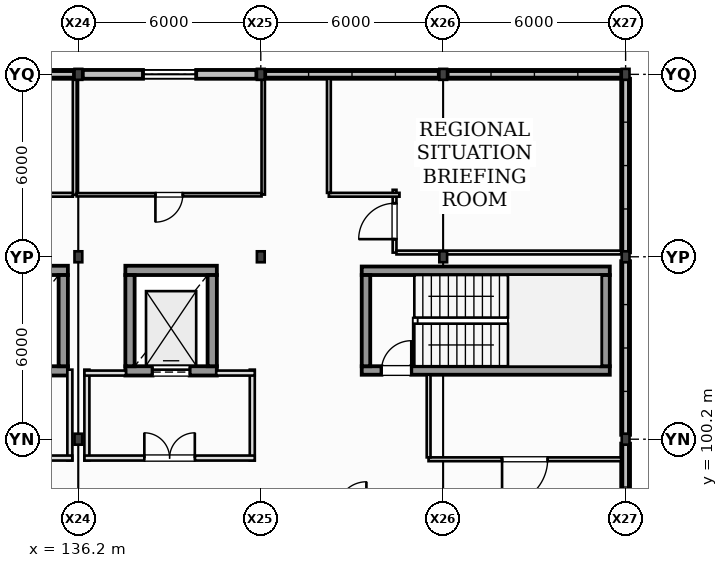
"""IFC4 building model, lengths in metres.
Left out: names, types, materials, properties, quantities, classifications, styles, units other than length and angle.
Written with IfcOpenShell. Run it as: python <this file> out.ifc"""

import sys

from ifc_helpers import new_model, si_unit, direction, frame, frame_2d, origin, origin_2d, place, context, subcontext, project, spatial, rectangle, i_section, extrude, element, fill, save


model = new_model("IFC4")
c1 = context("Model", 3, precision=1e-05, world=origin(), true_north=direction((0.0, 1.0)))
c2 = subcontext(c1, "Body", "Model", "MODEL_VIEW")
j1 = project(units=[si_unit("LENGTHUNIT", "METRE"), si_unit("PLANEANGLEUNIT", "RADIAN")], contexts=[c1])
p1 = place(None, origin())
s1 = spatial("IfcSite", under=j1, at=p1, CompositionType="ELEMENT")
p2 = place(p1, origin())
s2 = spatial("IfcBuilding", under=s1, at=p2, CompositionType="ELEMENT")
p3 = place(p2, frame((0.0, 0.0, 18.0)))
s3 = spatial("IfcBuildingStorey", under=s2, at=p3, CompositionType="ELEMENT", Elevation=18.0)
for number, where, z_axis, x_axis in (
    (1, (136.2, 100.2, 0.0), (0.0, 0.0, 1.0), (1.0, 0.0, 0.0)),
    (2, (136.2, 106.2, 0.0), (0.0, 0.0, 1.0), (1.0, 0.0, 0.0)),
    (3, (136.2, 112.2, 0.0), (0.0, 0.0, 1.0), (1.0, 0.0, 0.0)),
    (4, (142.2, 106.2, 0.0), (0.0, 0.0, 1.0), (1.0, 0.0, 0.0)),
    (5, (142.2, 112.2, 0.0), (0.0, 0.0, 1.0), (1.0, 0.0, 0.0)),
    (6, (148.2, 106.2, 0.0), (0.0, 0.0, 1.0), (1.0, 0.0, 0.0)),
    (7, (148.2, 112.2, 0.0), (0.0, 0.0, 1.0), (1.0, 0.0, 0.0)),
    (8, (154.2, 100.2, 0.0), (0.0, 0.0, 1.0), (1.0, 0.0, 0.0)),
    (9, (154.2, 106.2, 0.0), (0.0, 0.0, 1.0), (1.0, 0.0, 0.0)),
    (10, (154.2, 112.2, 0.0), (0.0, 0.0, 1.0), (1.0, 0.0, 0.0)),
):
    element("IfcColumn", number, at=place(p3, frame(where, z_axis=z_axis, x_axis=x_axis)), inside=s3, PredefinedType="COLUMN", context=c2, shape_type="SweptSolid", body=[
        extrude(i_section(OverallWidth=0.256, OverallDepth=0.36, WebThickness=0.011, FlangeThickness=0.02, at=origin_2d()), origin(), (0.0, 0.0, 1.0), 3.6),
    ])
p4 = place(p3, frame((136.055, 112.2, 0.0), z_axis=(0.0, 0.0, 1.0), x_axis=(-1.0, 0.0, 0.0)))
e11 = element("IfcWall", 11, at=p4, inside=s3, PredefinedType="STANDARD", context=c2, shape_type="SweptSolid", body=[
    extrude(rectangle(XDim=5.71, YDim=0.29, at=frame_2d((2.855, 0.0))), origin(), (0.0, 0.0, 1.0), 0.56),
])
p5 = place(p3, frame((142.055, 112.2, 0.0), z_axis=(0.0, 0.0, 1.0), x_axis=(-1.0, 0.0, 0.0)))
e12 = element("IfcWall", 12, at=p5, inside=s3, PredefinedType="STANDARD", context=c2, shape_type="SweptSolid", body=[
    extrude(rectangle(XDim=5.71, YDim=0.29, at=frame_2d((2.855, 0.0))), origin(), (0.0, 0.0, 1.0), 3.6),
])
p6 = place(p5, frame((1.98, 0.0, 0.85)))
e13 = element("IfcOpeningElement", 13, at=p6, cuts=e12, PredefinedType="OPENING", context=c2, shape_type="SweptSolid", body=[
    extrude(rectangle(XDim=1.75, YDim=1.75, at=frame_2d((0.875, 0.875))), frame((0.0, 0.155, 0.0), z_axis=(0.0, -1.0, 0.0), x_axis=(1.0, 0.0, 0.0)), (0.0, 0.0, 1.0), 0.31),
])
p7 = place(p3, frame((148.055, 112.2, 0.0), z_axis=(0.0, 0.0, 1.0), x_axis=(-1.0, 0.0, 0.0)))
e14 = element("IfcWall", 14, at=p7, inside=s3, PredefinedType="STANDARD", context=c2, shape_type="SweptSolid", body=[
    extrude(rectangle(XDim=5.71, YDim=0.29, at=frame_2d((2.855, 0.0))), origin(), (0.0, 0.0, 1.0), 0.68),
])
p8 = place(p3, frame((154.055, 112.2, 0.0), z_axis=(0.0, 0.0, 1.0), x_axis=(-1.0, 0.0, 0.0)))
e15 = element("IfcWall", 15, at=p8, inside=s3, PredefinedType="STANDARD", context=c2, shape_type="SweptSolid", body=[
    extrude(rectangle(XDim=5.71, YDim=0.29, at=frame_2d((2.855, 0.0))), origin(), (0.0, 0.0, 1.0), 0.8),
])
p9 = place(p3, frame((154.2, 94.345, 0.0), z_axis=(0.0, 0.0, 1.0), x_axis=(0.0, 1.0, 0.0)))
e16 = element("IfcWall", 16, at=p9, inside=s3, PredefinedType="STANDARD", context=c2, shape_type="SweptSolid", body=[
    extrude(rectangle(XDim=5.71, YDim=0.29, at=frame_2d((2.855, 0.0))), origin(), (0.0, 0.0, 1.0), 0.44),
])
p10 = place(p3, frame((154.2, 100.345, 0.0), z_axis=(0.0, 0.0, 1.0), x_axis=(0.0, 1.0, 0.0)))
e17 = element("IfcWall", 17, at=p10, inside=s3, PredefinedType="STANDARD", context=c2, shape_type="SweptSolid", body=[
    extrude(rectangle(XDim=5.71, YDim=0.29, at=frame_2d((2.855, 0.0))), origin(), (0.0, 0.0, 1.0), 0.56),
])
p11 = place(p3, frame((154.2, 106.345, 0.0), z_axis=(0.0, 0.0, 1.0), x_axis=(0.0, 1.0, 0.0)))
e18 = element("IfcWall", 18, at=p11, inside=s3, PredefinedType="STANDARD", context=c2, shape_type="SweptSolid", body=[
    extrude(rectangle(XDim=5.71, YDim=0.29, at=frame_2d((2.855, 0.0))), origin(), (0.0, 0.0, 1.0), 0.68),
])
p12 = place(p3, frame((145.52, 102.46, 0.0), z_axis=(0.0, 0.0, 1.0), x_axis=(1.0, 0.0, 0.0)))
e19 = element("IfcWall", 19, at=p12, inside=s3, PredefinedType="SHEAR", context=c2, shape_type="SweptSolid", body=[
    extrude(rectangle(XDim=8.16, YDim=0.28, at=frame_2d((4.08, 0.0))), origin(), (0.0, 0.0, 1.0), 3.45),
])
p13 = place(p12, frame((0.65, 0.0, 0.0)))
e20 = element("IfcOpeningElement", 20, at=p13, cuts=e19, PredefinedType="OPENING", context=c2, shape_type="SweptSolid", body=[
    extrude(rectangle(XDim=0.98, YDim=2.15, at=frame_2d((0.49, 1.075))), frame((0.0, 0.15, 0.0), z_axis=(0.0, -1.0, 0.0), x_axis=(1.0, 0.0, 0.0)), (0.0, 0.0, 1.0), 0.3),
])
p14 = place(p3, frame((153.68, 105.74, 0.0), z_axis=(0.0, 0.0, 1.0), x_axis=(-1.0, 0.0, 0.0)))
e21 = element("IfcWall", 21, at=p14, inside=s3, PredefinedType="SHEAR", context=c2, shape_type="SweptSolid", body=[
    extrude(rectangle(XDim=8.16, YDim=0.28, at=frame_2d((4.08, 0.0))), origin(), (0.0, 0.0, 1.0), 3.45),
])
for number, where, z_axis, x_axis in (
    (22, (145.66, 105.6, 0.0), (0.0, 0.0, 1.0), (0.0, -1.0, 0.0)),
    (23, (153.54, 102.6, 0.0), (0.0, 0.0, 1.0), (0.0, 1.0, 0.0)),
):
    element("IfcWall", number, at=place(p3, frame(where, z_axis=z_axis, x_axis=x_axis)), inside=s3, PredefinedType="SHEAR", context=c2, shape_type="SweptSolid", body=[
        extrude(rectangle(XDim=3.0, YDim=0.28, at=frame_2d((1.5, 0.0))), origin(), (0.0, 0.0, 1.0), 3.45),
    ])
p15 = place(p3, frame((132.845, 102.448, 0.0), z_axis=(0.0, 0.0, 1.0), x_axis=(1.0, 0.0, 0.0)))
e24 = element("IfcWall", 24, at=p15, inside=s3, PredefinedType="SHEAR", context=c2, shape_type="SweptSolid", body=[
    extrude(rectangle(XDim=3.01, YDim=0.305, at=frame_2d((1.505, 0.0))), origin(), (0.0, 0.0, 1.0), 3.45),
])
p16 = place(p15, frame((0.895, 0.0, 0.0)))
e25 = element("IfcOpeningElement", 25, at=p16, cuts=e24, PredefinedType="OPENING", context=c2, shape_type="SweptSolid", body=[
    extrude(rectangle(XDim=1.22, YDim=2.22, at=frame_2d((0.61, 1.11))), frame((0.0, 0.162, 0.0), z_axis=(0.0, -1.0, 0.0), x_axis=(1.0, 0.0, 0.0)), (0.0, 0.0, 1.0), 0.325),
])
p17 = place(p3, frame((135.855, 105.752, 0.0), z_axis=(0.0, 0.0, 1.0), x_axis=(-1.0, 0.0, 0.0)))
e26 = element("IfcWall", 26, at=p17, inside=s3, PredefinedType="SHEAR", context=c2, shape_type="SweptSolid", body=[
    extrude(rectangle(XDim=3.01, YDim=0.305, at=frame_2d((1.505, 0.0))), origin(), (0.0, 0.0, 1.0), 3.45),
])
p18 = place(p3, frame((135.702, 102.6, 0.0), z_axis=(0.0, 0.0, 1.0), x_axis=(0.0, 1.0, 0.0)))
e27 = element("IfcWall", 27, at=p18, inside=s3, PredefinedType="SHEAR", context=c2, shape_type="SweptSolid", body=[
    extrude(rectangle(XDim=3.0, YDim=0.305, at=frame_2d((1.5, 0.0))), origin(), (0.0, 0.0, 1.0), 3.45),
])
p19 = place(p3, frame((135.92, 102.488, 0.0), z_axis=(0.0, 0.0, 1.0), x_axis=(0.0, -1.0, 0.0)))
e28 = element("IfcWall", 28, at=p19, inside=s3, PredefinedType="PARTITIONING", context=c2, shape_type="SweptSolid", body=[
    extrude(rectangle(XDim=2.988, YDim=0.165, at=frame_2d((1.494, 0.0))), origin(), (0.0, 0.0, 1.0), 3.36),
])
p20 = place(p3, frame((130.4, 99.58, 0.0), z_axis=(0.0, 0.0, 1.0), x_axis=(1.0, 0.0, 0.0)))
e29 = element("IfcWall", 29, at=p20, inside=s3, PredefinedType="PARTITIONING", context=c2, shape_type="SweptSolid", body=[
    extrude(rectangle(XDim=5.6, YDim=0.165, at=frame_2d((2.8, 0.0))), origin(), (0.0, 0.0, 1.0), 3.36),
])
p21 = place(p20, frame((1.97, 0.0, 0.0)))
e30 = element("IfcOpeningElement", 30, at=p21, cuts=e29, PredefinedType="OPENING", context=c2, shape_type="SweptSolid", body=[
    extrude(rectangle(XDim=1.66, YDim=2.2, at=frame_2d((0.83, 1.1))), frame((0.0, 0.093, 0.0), z_axis=(0.0, -1.0, 0.0), x_axis=(1.0, 0.0, 0.0)), (0.0, 0.0, 1.0), 0.185),
])
p22 = place(p3, frame((137.745, 102.448, 0.0), z_axis=(0.0, 0.0, 1.0), x_axis=(1.0, 0.0, 0.0)))
e31 = element("IfcWall", 31, at=p22, inside=s3, PredefinedType="SHEAR", context=c2, shape_type="SweptSolid", body=[
    extrude(rectangle(XDim=3.01, YDim=0.305, at=frame_2d((1.505, 0.0))), origin(), (0.0, 0.0, 1.0), 3.45),
])
p23 = place(p22, frame((0.895, 0.0, 0.0)))
e32 = element("IfcOpeningElement", 32, at=p23, cuts=e31, PredefinedType="OPENING", context=c2, shape_type="SweptSolid", body=[
    extrude(rectangle(XDim=1.22, YDim=2.22, at=frame_2d((0.61, 1.11))), frame((0.0, 0.162, 0.0), z_axis=(0.0, -1.0, 0.0), x_axis=(1.0, 0.0, 0.0)), (0.0, 0.0, 1.0), 0.325),
])
p24 = place(p3, frame((140.755, 105.752, 0.0), z_axis=(0.0, 0.0, 1.0), x_axis=(-1.0, 0.0, 0.0)))
e33 = element("IfcWall", 33, at=p24, inside=s3, PredefinedType="SHEAR", context=c2, shape_type="SweptSolid", body=[
    extrude(rectangle(XDim=3.01, YDim=0.305, at=frame_2d((1.505, 0.0))), origin(), (0.0, 0.0, 1.0), 3.45),
])
for number, where, z_axis, x_axis in (
    (34, (137.897, 105.6, 0.0), (0.0, 0.0, 1.0), (0.0, -1.0, 0.0)),
    (35, (140.603, 102.6, 0.0), (0.0, 0.0, 1.0), (0.0, 1.0, 0.0)),
):
    element("IfcWall", number, at=place(p3, frame(where, z_axis=z_axis, x_axis=x_axis)), inside=s3, PredefinedType="SHEAR", context=c2, shape_type="SweptSolid", body=[
        extrude(rectangle(XDim=3.0, YDim=0.305, at=frame_2d((1.5, 0.0))), origin(), (0.0, 0.0, 1.0), 3.45),
    ])
p25 = place(p3, frame((136.48, 99.5, 0.0), z_axis=(0.0, 0.0, 1.0), x_axis=(0.0, 1.0, 0.0)))
e36 = element("IfcWall", 36, at=p25, inside=s3, PredefinedType="PARTITIONING", context=c2, shape_type="SweptSolid", body=[
    extrude(rectangle(XDim=2.988, YDim=0.165, at=frame_2d((1.494, 0.0))), origin(), (0.0, 0.0, 1.0), 3.36),
])
p26 = place(p3, frame((141.92, 102.488, 0.0), z_axis=(0.0, 0.0, 1.0), x_axis=(0.0, -1.0, 0.0)))
e37 = element("IfcWall", 37, at=p26, inside=s3, PredefinedType="PARTITIONING", context=c2, shape_type="SweptSolid", body=[
    extrude(rectangle(XDim=2.988, YDim=0.165, at=frame_2d((1.494, 0.0))), origin(), (0.0, 0.0, 1.0), 3.246),
])
p27 = place(p3, frame((136.4, 102.375, 0.0), z_axis=(0.0, 0.0, 1.0), x_axis=(1.0, 0.0, 0.0)))
e38 = element("IfcWall", 38, at=p27, inside=s3, PredefinedType="PARTITIONING", context=c2, shape_type="SweptSolid", body=[
    extrude(rectangle(XDim=1.365, YDim=0.165, at=frame_2d((0.683, 0.0))), origin(), (0.0, 0.0, 1.0), 3.36),
])
p28 = place(p3, frame((140.735, 102.375, 0.0), z_axis=(0.0, 0.0, 1.0), x_axis=(1.0, 0.0, 0.0)))
e39 = element("IfcWall", 39, at=p28, inside=s3, PredefinedType="PARTITIONING", context=c2, shape_type="SweptSolid", body=[
    extrude(rectangle(XDim=1.265, YDim=0.165, at=frame_2d((0.632, 0.0))), origin(), (0.0, 0.0, 1.0), 3.36),
])
p29 = place(p3, frame((136.4, 99.58, 0.0), z_axis=(0.0, 0.0, 1.0), x_axis=(1.0, 0.0, 0.0)))
e40 = element("IfcWall", 40, at=p29, inside=s3, PredefinedType="PARTITIONING", context=c2, shape_type="SweptSolid", body=[
    extrude(rectangle(XDim=5.6, YDim=0.165, at=frame_2d((2.8, 0.0))), origin(), (0.0, 0.0, 1.0), 3.36),
])
p30 = place(p29, frame((1.97, 0.0, 0.0)))
e41 = element("IfcOpeningElement", 41, at=p30, cuts=e40, PredefinedType="OPENING", context=c2, shape_type="SweptSolid", body=[
    extrude(rectangle(XDim=1.66, YDim=2.2, at=frame_2d((0.83, 1.1))), frame((0.0, 0.093, 0.0), z_axis=(0.0, -1.0, 0.0), x_axis=(1.0, 0.0, 0.0)), (0.0, 0.0, 1.0), 0.185),
])
p31 = place(p3, frame((136.08, 112.055, 0.0), z_axis=(0.0, 0.0, 1.0), x_axis=(0.0, -1.0, 0.0)))
e42 = element("IfcWall", 42, at=p31, inside=s3, PredefinedType="PARTITIONING", context=c2, shape_type="SweptSolid", body=[
    extrude(rectangle(XDim=3.817, YDim=0.125, at=frame_2d((1.909, 0.0))), origin(), (0.0, 0.0, 1.0), 3.36),
])
p32 = place(p3, frame((136.018, 108.24, 0.0), z_axis=(0.0, 0.0, 1.0), x_axis=(-1.0, 0.0, 0.0)))
e43 = element("IfcWall", 43, at=p32, inside=s3, PredefinedType="PARTITIONING", context=c2, shape_type="SweptSolid", body=[
    extrude(rectangle(XDim=2.38, YDim=0.125, at=frame_2d((1.19, 0.0))), origin(), (0.0, 0.0, 1.0), 3.36),
])
p33 = place(p32, frame((0.74, 0.0, 0.0)))
e44 = element("IfcOpeningElement", 44, at=p33, cuts=e43, PredefinedType="OPENING", context=c2, shape_type="SweptSolid", body=[
    extrude(rectangle(XDim=0.9, YDim=2.1, at=frame_2d((0.45, 1.05))), frame((0.0, 0.073, 0.0), z_axis=(0.0, -1.0, 0.0), x_axis=(1.0, 0.0, 0.0)), (0.0, 0.0, 1.0), 0.145),
])
p34 = place(p3, frame((142.28, 112.055, 0.0), z_axis=(0.0, 0.0, 1.0), x_axis=(0.0, -1.0, 0.0)))
e45 = element("IfcWall", 45, at=p34, inside=s3, PredefinedType="PARTITIONING", context=c2, shape_type="SweptSolid", body=[
    extrude(rectangle(XDim=3.81, YDim=0.11, at=frame_2d((1.905, 0.0))), origin(), (0.0, 0.0, 1.0), 3.36),
])
p35 = place(p3, frame((142.225, 108.24, 0.0), z_axis=(0.0, 0.0, 1.0), x_axis=(-1.0, 0.0, 0.0)))
e46 = element("IfcWall", 46, at=p35, inside=s3, PredefinedType="PARTITIONING", context=c2, shape_type="SweptSolid", body=[
    extrude(rectangle(XDim=6.083, YDim=0.11, at=frame_2d((3.041, 0.0))), origin(), (0.0, 0.0, 1.0), 3.36),
])
p36 = place(p35, frame((2.591, 0.0, 0.0)))
e47 = element("IfcOpeningElement", 47, at=p36, cuts=e46, PredefinedType="OPENING", context=c2, shape_type="SweptSolid", body=[
    extrude(rectangle(XDim=0.9, YDim=2.1, at=frame_2d((0.45, 1.05))), frame((0.0, 0.065, 0.0), z_axis=(0.0, -1.0, 0.0), x_axis=(1.0, 0.0, 0.0)), (0.0, 0.0, 1.0), 0.13),
])
p37 = place(p3, frame((146.6, 106.337, 0.0), z_axis=(0.0, 0.0, 1.0), x_axis=(0.0, 1.0, 0.0)))
e48 = element("IfcWall", 48, at=p37, inside=s3, PredefinedType="PARTITIONING", context=c2, shape_type="SweptSolid", body=[
    extrude(rectangle(XDim=2.065, YDim=0.125, at=frame_2d((1.033, 0.0))), origin(), (0.0, 0.0, 1.0), 3.36),
])
p38 = place(p37, frame((0.442, 0.0, 0.0)))
e49 = element("IfcOpeningElement", 49, at=p38, cuts=e48, PredefinedType="OPENING", context=c2, shape_type="SweptSolid", body=[
    extrude(rectangle(XDim=1.18, YDim=2.16, at=frame_2d((0.59, 1.08))), frame((0.0, 0.073, 0.0), z_axis=(0.0, -1.0, 0.0), x_axis=(1.0, 0.0, 0.0)), (0.0, 0.0, 1.0), 0.145),
])
p39 = place(p3, frame((146.762, 108.24, 0.0), z_axis=(0.0, 0.0, 1.0), x_axis=(-1.0, 0.0, 0.0)))
e50 = element("IfcWall", 50, at=p39, inside=s3, PredefinedType="PARTITIONING", context=c2, shape_type="SweptSolid", body=[
    extrude(rectangle(XDim=2.325, YDim=0.125, at=frame_2d((1.163, 0.0))), origin(), (0.0, 0.0, 1.0), 3.36),
])
p40 = place(p3, frame((144.44, 108.302, 0.0), z_axis=(0.0, 0.0, 1.0), x_axis=(0.0, 1.0, 0.0)))
e51 = element("IfcWall", 51, at=p40, inside=s3, PredefinedType="PARTITIONING", context=c2, shape_type="SweptSolid", body=[
    extrude(rectangle(XDim=3.752, YDim=0.125, at=frame_2d((1.876, 0.0))), origin(), (0.0, 0.0, 1.0), 3.36),
])
p41 = place(p3, frame((154.055, 106.34, 0.0), z_axis=(0.0, 0.0, 1.0), x_axis=(-1.0, 0.0, 0.0)))
e52 = element("IfcWall", 52, at=p41, inside=s3, PredefinedType="PARTITIONING", context=c2, shape_type="SweptSolid", body=[
    extrude(rectangle(XDim=7.392, YDim=0.125, at=frame_2d((3.696, 0.0))), origin(), (0.0, 0.0, 1.0), 3.36),
])
p42 = place(p3, frame((154.055, 99.54, 0.0), z_axis=(0.0, 0.0, 1.0), x_axis=(-1.0, 0.0, 0.0)))
e53 = element("IfcWall", 53, at=p42, inside=s3, PredefinedType="PARTITIONING", context=c2, shape_type="SweptSolid", body=[
    extrude(rectangle(XDim=6.337, YDim=0.125, at=frame_2d((3.169, 0.0))), origin(), (0.0, 0.0, 1.0), 3.36),
])
p43 = place(p42, frame((2.419, 0.0, 0.0)))
e54 = element("IfcOpeningElement", 54, at=p43, cuts=e53, PredefinedType="OPENING", context=c2, shape_type="SweptSolid", body=[
    extrude(rectangle(XDim=1.5, YDim=2.22, at=frame_2d((0.75, 1.11))), frame((0.0, 0.073, 0.0), z_axis=(0.0, -1.0, 0.0), x_axis=(1.0, 0.0, 0.0)), (0.0, 0.0, 1.0), 0.145),
])
p44 = place(p3, frame((147.72, 99.603, 0.0), z_axis=(0.0, 0.0, 1.0), x_axis=(0.0, 1.0, 0.0)))
e55 = element("IfcWall", 55, at=p44, inside=s3, PredefinedType="PARTITIONING", context=c2, shape_type="SweptSolid", body=[
    extrude(rectangle(XDim=2.718, YDim=0.125, at=frame_2d((1.359, 0.0))), origin(), (0.0, 0.0, 1.0), 3.36),
])
p45 = place(p6, origin())
e56 = element("IfcWindow", 56, at=p45, inside=s3, PartitioningType="SINGLE_PANEL", PredefinedType="WINDOW", context=c2, shape_type="SweptSolid", body=[
    extrude(rectangle(XDim=1.75, YDim=1.75, at=frame_2d((0.875, 0.875))), frame((0.0, 0.03, 0.0), z_axis=(0.0, -1.0, 0.0), x_axis=(1.0, 0.0, 0.0)), (0.0, 0.0, 1.0), 0.06),
])
fill(e13, e56)
p46 = place(p2, frame((0.0, 0.0, 25.2)))
p47 = place(p46, frame((0.0, 0.0, -4.02)))
p48 = place(p47, frame((136.2, 107.6, -0.01)))
p49 = place(p48, frame((0.0, 0.0, 0.37)))
e57 = element("IfcWindow", 57, at=p49, inside=s3, PartitioningType="SINGLE_PANEL", PredefinedType="SKYLIGHT", context=c2, shape_type="SweptSolid", body=[
    extrude(rectangle(XDim=1.75, YDim=1.35, at=origin_2d()), origin(), (0.0, 0.0, 1.0), 0.06),
])
p50 = place(p47, frame((139.2, 107.6, -0.01)))
p51 = place(p50, frame((0.0, 0.0, 0.37)))
e58 = element("IfcWindow", 58, at=p51, inside=s3, PartitioningType="SINGLE_PANEL", PredefinedType="SKYLIGHT", context=c2, shape_type="SweptSolid", body=[
    extrude(rectangle(XDim=1.95, YDim=1.48, at=origin_2d()), origin(), (0.0, 0.0, 1.0), 0.06),
])
p52 = place(p47, frame((145.2, 107.6, -0.01)))
p53 = place(p52, frame((0.0, 0.0, 0.37)))
e59 = element("IfcWindow", 59, at=p53, inside=s3, PartitioningType="SINGLE_PANEL", PredefinedType="SKYLIGHT", context=c2, shape_type="SweptSolid", body=[
    extrude(rectangle(XDim=2.15, YDim=1.62, at=origin_2d()), origin(), (0.0, 0.0, 1.0), 0.06),
])
p54 = place(p47, frame((148.2, 107.6, -0.01)))
p55 = place(p54, frame((0.0, 0.0, 0.37)))
e60 = element("IfcWindow", 60, at=p55, inside=s3, PartitioningType="SINGLE_PANEL", PredefinedType="SKYLIGHT", context=c2, shape_type="SweptSolid", body=[
    extrude(rectangle(XDim=1.15, YDim=1.15, at=origin_2d()), origin(), (0.0, 0.0, 1.0), 0.06),
])
p56 = place(p47, frame((151.2, 107.6, -0.01)))
p57 = place(p56, frame((0.0, 0.0, 0.37)))
e61 = element("IfcWindow", 61, at=p57, inside=s3, PartitioningType="SINGLE_PANEL", PredefinedType="SKYLIGHT", context=c2, shape_type="SweptSolid", body=[
    extrude(rectangle(XDim=1.35, YDim=1.35, at=origin_2d()), origin(), (0.0, 0.0, 1.0), 0.06),
])
p58 = place(p13, origin())
e62 = element("IfcDoor", 62, at=p58, inside=s3, OperationType="SINGLE_SWING_RIGHT", PredefinedType="DOOR", context=c2, shape_type="SweptSolid", body=[
    extrude(rectangle(XDim=0.98, YDim=2.15, at=frame_2d((0.49, 1.075))), frame((0.0, 0.025, 0.0), z_axis=(0.0, -1.0, 0.0), x_axis=(1.0, 0.0, 0.0)), (0.0, 0.0, 1.0), 0.05),
])
fill(e20, e62)
p59 = place(p23, origin())
e63 = element("IfcDoor", 63, at=p59, inside=s3, OperationType="SLIDING_TO_LEFT", PredefinedType="DOOR", context=c2, shape_type="SweptSolid", body=[
    extrude(rectangle(XDim=1.22, YDim=2.22, at=frame_2d((0.61, 1.11))), frame((0.0, 0.025, 0.0), z_axis=(0.0, -1.0, 0.0), x_axis=(1.0, 0.0, 0.0)), (0.0, 0.0, 1.0), 0.05),
])
fill(e32, e63)
p60 = place(p30, frame((1.66, 0.0, 0.0), z_axis=(0.0, 0.0, 1.0), x_axis=(-1.0, 0.0, 0.0)))
e64 = element("IfcDoor", 64, at=p60, inside=s3, OperationType="DOUBLE_DOOR_SINGLE_SWING", PredefinedType="DOOR", context=c2, shape_type="SweptSolid", body=[
    extrude(rectangle(XDim=1.66, YDim=2.2, at=frame_2d((0.83, 1.1))), frame((0.0, 0.025, 0.0), z_axis=(0.0, -1.0, 0.0), x_axis=(1.0, 0.0, 0.0)), (0.0, 0.0, 1.0), 0.05),
])
fill(e41, e64)
p61 = place(p36, frame((0.9, 0.0, 0.0), z_axis=(0.0, 0.0, 1.0), x_axis=(-1.0, 0.0, 0.0)))
e65 = element("IfcDoor", 65, at=p61, inside=s3, OperationType="SINGLE_SWING_RIGHT", PredefinedType="DOOR", context=c2, shape_type="SweptSolid", body=[
    extrude(rectangle(XDim=0.9, YDim=2.1, at=frame_2d((0.45, 1.05))), frame((0.0, 0.025, 0.0), z_axis=(0.0, -1.0, 0.0), x_axis=(1.0, 0.0, 0.0)), (0.0, 0.0, 1.0), 0.05),
])
fill(e47, e65)
p62 = place(p38, origin())
e66 = element("IfcDoor", 66, at=p62, inside=s3, OperationType="SINGLE_SWING_LEFT", PredefinedType="DOOR", context=c2, shape_type="SweptSolid", body=[
    extrude(rectangle(XDim=1.18, YDim=2.16, at=frame_2d((0.59, 1.08))), frame((0.0, 0.025, 0.0), z_axis=(0.0, -1.0, 0.0), x_axis=(1.0, 0.0, 0.0)), (0.0, 0.0, 1.0), 0.05),
])
fill(e49, e66)
p63 = place(p43, frame((1.5, 0.0, 0.0), z_axis=(0.0, 0.0, 1.0), x_axis=(-1.0, 0.0, 0.0)))
e67 = element("IfcDoor", 67, at=p63, inside=s3, OperationType="SINGLE_SWING_RIGHT", PredefinedType="DOOR", context=c2, shape_type="SweptSolid", body=[
    extrude(rectangle(XDim=1.5, YDim=2.22, at=frame_2d((0.75, 1.11))), frame((0.0, 0.025, 0.0), z_axis=(0.0, -1.0, 0.0), x_axis=(1.0, 0.0, 0.0)), (0.0, 0.0, 1.0), 0.05),
])
fill(e54, e67)
save(model, sys.argv[1])
